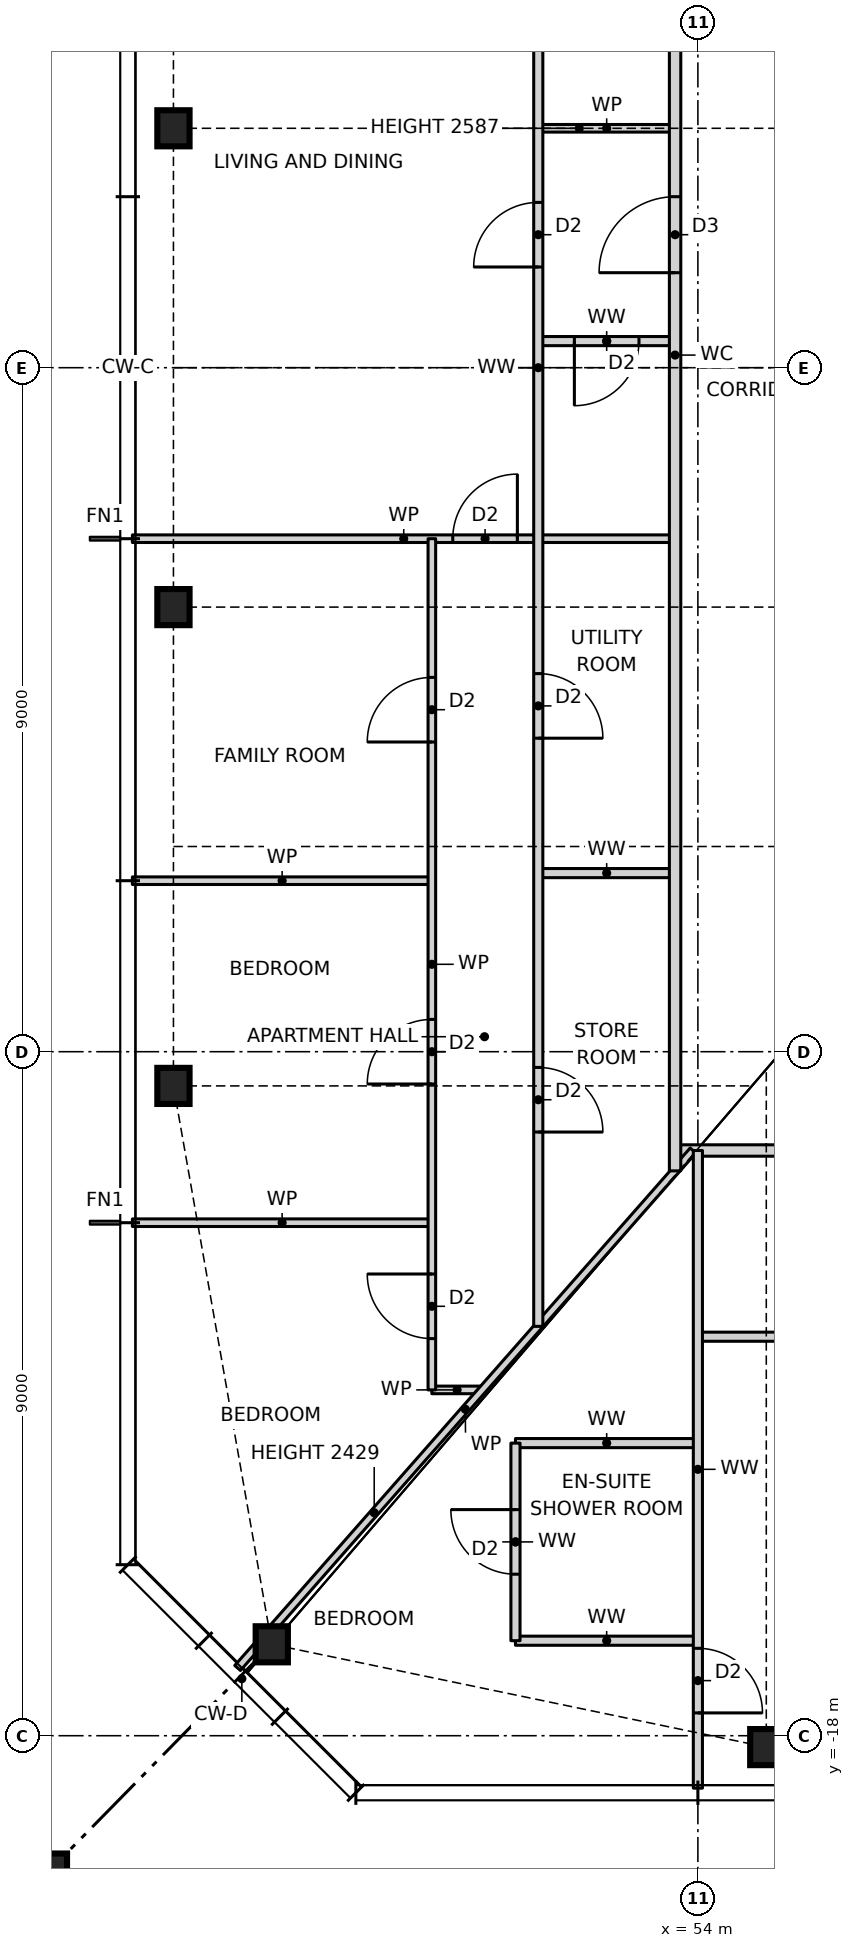
"""IFC4 building model, lengths in metres.
Left out: names, types, materials, properties, quantities, classifications, styles, units other than length and angle.
Written with IfcOpenShell. Run it as: python <this file> out.ifc"""

import sys

from ifc_helpers import new_model, si_unit, direction, frame, frame_2d, origin, origin_2d, place, context, subcontext, project, spatial, rectangle, hollow_rectangle, i_section, extrude, element, fill, save


model = new_model("IFC4")
c1 = context("Model", 3, precision=1e-05, world=origin(), true_north=direction((0.0, 1.0)))
c2 = subcontext(c1, "Body", "Model", "MODEL_VIEW")
j1 = project(units=[si_unit("LENGTHUNIT", "METRE"), si_unit("PLANEANGLEUNIT", "RADIAN")], contexts=[c1])
p1 = place(None, origin())
s1 = spatial("IfcSite", under=j1, at=p1, CompositionType="ELEMENT")
p2 = place(p1, origin())
s2 = spatial("IfcBuilding", under=s1, at=p2, CompositionType="ELEMENT")
p3 = place(p2, frame((0.0, 0.0, 43.0)))
s3 = spatial("IfcBuildingStorey", under=s2, at=p3, CompositionType="ELEMENT", Elevation=43.0)
for number, where, z_axis, x_axis in (
    (1, (48.394, -16.797, 0.0), (0.0, 0.0, 1.0), (1.0, 0.0, 0.0)),
    (2, (54.9, -18.15, 0.0), (0.0, 0.0, 1.0), (1.0, 0.0, 0.0)),
    (3, (47.1, 3.15, 0.0), (0.0, 0.0, 1.0), (1.0, 0.0, 0.0)),
    (4, (47.1, -3.15, 0.0), (0.0, 0.0, 1.0), (1.0, 0.0, 0.0)),
    (5, (47.1, -9.45, 0.0), (0.0, 0.0, 1.0), (1.0, 0.0, 0.0)),
):
    element("IfcColumn", number, at=place(p3, frame(where, z_axis=z_axis, x_axis=x_axis)), inside=s3, PredefinedType="COLUMN", context=c2, shape_type="SweptSolid", body=[
        extrude(i_section(OverallWidth=0.424, OverallDepth=0.475, WebThickness=0.048, FlangeThickness=0.077, at=origin_2d()), origin(), (0.0, 0.0, 1.0), 3.5),
    ])
p4 = place(p3, frame((45.1, -20.15, 0.0), z_axis=(0.0, 0.0, 1.0), x_axis=(1.0, 0.0, 0.0)))
e6 = element("IfcColumn", 6, at=p4, inside=s3, PredefinedType="COLUMN", context=c2, shape_type="SweptSolid", body=[
    extrude(hollow_rectangle(XDim=1.2, YDim=1.2, WallThickness=0.07, at=origin_2d()), origin(), (0.0, 0.0, 1.0), 3.5),
])
for number, where, z_axis, x_axis in (
    (7, (51.6, -16.75, 0.0), (0.0, 0.0, 1.0), (1.0, 0.0, 0.0)),
    (8, (51.6, -14.15, 0.0), (0.0, 0.0, 1.0), (1.0, 0.0, 0.0)),
):
    element("IfcWall", number, at=place(p3, frame(where, z_axis=z_axis, x_axis=x_axis)), inside=s3, PredefinedType="PARTITIONING", context=c2, shape_type="SweptSolid", body=[
        extrude(rectangle(XDim=2.4, YDim=0.12, at=frame_2d((1.2, 0.0))), origin(), (0.0, 0.0, 1.0), 3.27),
    ])
p5 = place(p3, frame((50.5, -13.45, 0.0), z_axis=(0.0, 0.0, 1.0), x_axis=(1.0, 0.0, 0.0)))
e9 = element("IfcWall", 9, at=p5, inside=s3, PredefinedType="PARTITIONING", context=c2, shape_type="SweptSolid", body=[
    extrude(rectangle(XDim=0.664, YDim=0.1, at=frame_2d((0.332, 0.0))), origin(), (0.0, 0.0, 1.0), 3.27),
])
p6 = place(p3, frame((54.0, -12.75, 0.0), z_axis=(0.0, 0.0, 1.0), x_axis=(1.0, 0.0, 0.0)))
e10 = element("IfcWall", 10, at=p6, inside=s3, PredefinedType="PARTITIONING", context=c2, shape_type="SweptSolid", body=[
    extrude(rectangle(XDim=20.2, YDim=0.12, at=frame_2d((10.1, 0.0))), origin(), (0.0, 0.0, 1.0), 3.27),
])
p7 = place(p6, frame((1.375, 0.0, 0.0)))
e11 = element("IfcOpeningElement", 11, at=p7, cuts=e10, PredefinedType="OPENING", context=c2, shape_type="SweptSolid", body=[
    extrude(rectangle(XDim=0.85, YDim=2.1, at=frame_2d((0.425, 1.05))), frame((0.0, 0.07, 0.0), z_axis=(0.0, -1.0, 0.0), x_axis=(1.0, 0.0, 0.0)), (0.0, 0.0, 1.0), 0.14),
])
p8 = place(p6, frame((4.575, 0.0, 0.0)))
e12 = element("IfcOpeningElement", 12, at=p8, cuts=e10, PredefinedType="OPENING", context=c2, shape_type="SweptSolid", body=[
    extrude(rectangle(XDim=0.85, YDim=2.1, at=frame_2d((0.425, 1.05))), frame((0.0, 0.07, 0.0), z_axis=(0.0, -1.0, 0.0), x_axis=(1.0, 0.0, 0.0)), (0.0, 0.0, 1.0), 0.14),
])
p9 = place(p6, frame((10.225, 0.0, 0.0)))
e13 = element("IfcOpeningElement", 13, at=p9, cuts=e10, PredefinedType="OPENING", context=c2, shape_type="SweptSolid", body=[
    extrude(rectangle(XDim=0.85, YDim=2.1, at=frame_2d((0.425, 1.05))), frame((0.0, 0.07, 0.0), z_axis=(0.0, -1.0, 0.0), x_axis=(1.0, 0.0, 0.0)), (0.0, 0.0, 1.0), 0.14),
])
p10 = place(p6, frame((15.825, 0.0, 0.0)))
e14 = element("IfcOpeningElement", 14, at=p10, cuts=e10, PredefinedType="OPENING", context=c2, shape_type="SweptSolid", body=[
    extrude(rectangle(XDim=0.85, YDim=2.1, at=frame_2d((0.425, 1.05))), frame((0.0, 0.07, 0.0), z_axis=(0.0, -1.0, 0.0), x_axis=(1.0, 0.0, 0.0)), (0.0, 0.0, 1.0), 0.14),
])
p11 = place(p3, frame((46.56, -11.25, 0.0), z_axis=(0.0, 0.0, 1.0), x_axis=(1.0, 0.0, 0.0)))
e15 = element("IfcWall", 15, at=p11, inside=s3, PredefinedType="PARTITIONING", context=c2, shape_type="SweptSolid", body=[
    extrude(rectangle(XDim=3.94, YDim=0.1, at=frame_2d((1.97, 0.0))), origin(), (0.0, 0.0, 1.0), 3.27),
])
p12 = place(p3, frame((53.7, -10.3, 0.0), z_axis=(0.0, 0.0, 1.0), x_axis=(1.0, 0.0, 0.0)))
e16 = element("IfcWall", 16, at=p12, inside=s3, PredefinedType="PARTITIONING", context=c2, shape_type="SweptSolid", body=[
    extrude(rectangle(XDim=18.6, YDim=0.15, at=frame_2d((9.3, 0.0))), origin(), (0.0, 0.0, 1.0), 3.27),
])
p13 = place(p12, frame((4.8, 0.0, 0.0)))
e17 = element("IfcOpeningElement", 17, at=p13, cuts=e16, PredefinedType="OPENING", context=c2, shape_type="SweptSolid", body=[
    extrude(rectangle(XDim=1.0, YDim=2.1, at=frame_2d((0.5, 1.05))), frame((0.0, 0.085, 0.0), z_axis=(0.0, -1.0, 0.0), x_axis=(1.0, 0.0, 0.0)), (0.0, 0.0, 1.0), 0.17),
])
p14 = place(p3, frame((46.56, -6.75, 0.0), z_axis=(0.0, 0.0, 1.0), x_axis=(1.0, 0.0, 0.0)))
e18 = element("IfcWall", 18, at=p14, inside=s3, PredefinedType="PARTITIONING", context=c2, shape_type="SweptSolid", body=[
    extrude(rectangle(XDim=3.94, YDim=0.1, at=frame_2d((1.97, 0.0))), origin(), (0.0, 0.0, 1.0), 3.27),
])
p15 = place(p3, frame((51.9, -6.65, 0.0), z_axis=(0.0, 0.0, 1.0), x_axis=(1.0, 0.0, 0.0)))
e19 = element("IfcWall", 19, at=p15, inside=s3, PredefinedType="PARTITIONING", context=c2, shape_type="SweptSolid", body=[
    extrude(rectangle(XDim=1.8, YDim=0.12, at=frame_2d((0.9, 0.0))), origin(), (0.0, 0.0, 1.0), 3.27),
])
p16 = place(p3, frame((46.56, -2.25, 0.0), z_axis=(0.0, 0.0, 1.0), x_axis=(1.0, 0.0, 0.0)))
e20 = element("IfcWall", 20, at=p16, inside=s3, PredefinedType="PARTITIONING", context=c2, shape_type="SweptSolid", body=[
    extrude(rectangle(XDim=7.14, YDim=0.1, at=frame_2d((3.57, 0.0))), origin(), (0.0, 0.0, 1.0), 3.27),
])
p17 = place(p16, frame((4.215, 0.0, 0.0)))
e21 = element("IfcOpeningElement", 21, at=p17, cuts=e20, PredefinedType="OPENING", context=c2, shape_type="SweptSolid", body=[
    extrude(rectangle(XDim=0.85, YDim=2.1, at=frame_2d((0.425, 1.05))), frame((0.0, 0.06, 0.0), z_axis=(0.0, -1.0, 0.0), x_axis=(1.0, 0.0, 0.0)), (0.0, 0.0, 1.0), 0.12),
])
p18 = place(p3, frame((51.9, 0.35, 0.0), z_axis=(0.0, 0.0, 1.0), x_axis=(1.0, 0.0, 0.0)))
e22 = element("IfcWall", 22, at=p18, inside=s3, PredefinedType="PARTITIONING", context=c2, shape_type="SweptSolid", body=[
    extrude(rectangle(XDim=1.8, YDim=0.12, at=frame_2d((0.9, 0.0))), origin(), (0.0, 0.0, 1.0), 3.27),
])
p19 = place(p18, frame((0.475, 0.0, 0.0)))
e23 = element("IfcOpeningElement", 23, at=p19, cuts=e22, PredefinedType="OPENING", context=c2, shape_type="SweptSolid", body=[
    extrude(rectangle(XDim=0.85, YDim=2.1, at=frame_2d((0.425, 1.05))), frame((0.0, 0.07, 0.0), z_axis=(0.0, -1.0, 0.0), x_axis=(1.0, 0.0, 0.0)), (0.0, 0.0, 1.0), 0.14),
])
p20 = place(p3, frame((51.9, 3.15, 0.0), z_axis=(0.0, 0.0, 1.0), x_axis=(1.0, 0.0, 0.0)))
e24 = element("IfcWall", 24, at=p20, inside=s3, PredefinedType="PARTITIONING", context=c2, shape_type="SweptSolid", body=[
    extrude(rectangle(XDim=1.8, YDim=0.1, at=frame_2d((0.9, 0.0))), origin(), (0.0, 0.0, 1.0), 2.587),
])
p21 = place(p3, frame((47.944, -17.109, 0.0), z_axis=(0.0, 0.0, 1.0), x_axis=(0.660638210404, 0.750704439146, 0.0)))
e25 = element("IfcWall", 25, at=p21, inside=s3, PredefinedType="PARTITIONING", context=c2, shape_type="SweptSolid", body=[
    extrude(rectangle(XDim=9.07, YDim=0.1, at=frame_2d((4.535, 0.0))), origin(), (0.0, 0.0, 1.0), 2.429),
])
p22 = place(p3, frame((54.0, -18.69, 0.0), z_axis=(0.0, 0.0, 1.0), x_axis=(0.0, 1.0, 0.0)))
e26 = element("IfcWall", 26, at=p22, inside=s3, PredefinedType="PARTITIONING", context=c2, shape_type="SweptSolid", body=[
    extrude(rectangle(XDim=8.39, YDim=0.12, at=frame_2d((4.195, 0.0))), origin(), (0.0, 0.0, 1.0), 3.27),
])
p23 = place(p22, frame((0.99, 0.0, 0.0)))
e27 = element("IfcOpeningElement", 27, at=p23, cuts=e26, PredefinedType="OPENING", context=c2, shape_type="SweptSolid", body=[
    extrude(rectangle(XDim=0.85, YDim=2.1, at=frame_2d((0.425, 1.05))), frame((0.0, 0.07, 0.0), z_axis=(0.0, -1.0, 0.0), x_axis=(1.0, 0.0, 0.0)), (0.0, 0.0, 1.0), 0.14),
])
p24 = place(p3, frame((53.7, -10.568, 0.0), z_axis=(0.0, 0.0, 1.0), x_axis=(0.0, 1.0, 0.0)))
e28 = element("IfcWall", 28, at=p24, inside=s3, PredefinedType="PARTITIONING", context=c2, shape_type="SweptSolid", body=[
    extrude(rectangle(XDim=21.468, YDim=0.15, at=frame_2d((10.734, 0.0))), origin(), (0.0, 0.0, 1.0), 3.27),
])
p25 = place(p24, frame((11.818, 0.0, 0.0)))
e29 = element("IfcOpeningElement", 29, at=p25, cuts=e28, PredefinedType="OPENING", context=c2, shape_type="SweptSolid", body=[
    extrude(rectangle(XDim=1.0, YDim=2.1, at=frame_2d((0.5, 1.05))), frame((0.0, 0.085, 0.0), z_axis=(0.0, -1.0, 0.0), x_axis=(1.0, 0.0, 0.0)), (0.0, 0.0, 1.0), 0.17),
])
p26 = place(p3, frame((51.9, -12.614, 0.0), z_axis=(0.0, 0.0, 1.0), x_axis=(0.0, 1.0, 0.0)))
e30 = element("IfcWall", 30, at=p26, inside=s3, PredefinedType="PARTITIONING", context=c2, shape_type="SweptSolid", body=[
    extrude(rectangle(XDim=25.228, YDim=0.12, at=frame_2d((12.614, 0.0))), origin(), (0.0, 0.0, 1.0), 3.27),
])
p27 = place(p26, frame((17.139, 0.0, 0.0)))
e31 = element("IfcOpeningElement", 31, at=p27, cuts=e30, PredefinedType="OPENING", context=c2, shape_type="SweptSolid", body=[
    extrude(rectangle(XDim=0.85, YDim=2.1, at=frame_2d((0.425, 1.05))), frame((0.0, 0.07, 0.0), z_axis=(0.0, -1.0, 0.0), x_axis=(1.0, 0.0, 0.0)), (0.0, 0.0, 1.0), 0.14),
])
p28 = place(p26, frame((13.939, 0.0, 0.0)))
e32 = element("IfcOpeningElement", 32, at=p28, cuts=e30, PredefinedType="OPENING", context=c2, shape_type="SweptSolid", body=[
    extrude(rectangle(XDim=0.85, YDim=2.1, at=frame_2d((0.425, 1.05))), frame((0.0, 0.07, 0.0), z_axis=(0.0, -1.0, 0.0), x_axis=(1.0, 0.0, 0.0)), (0.0, 0.0, 1.0), 0.14),
])
p29 = place(p26, frame((21.871, 0.0, 0.0)))
e33 = element("IfcOpeningElement", 33, at=p29, cuts=e30, PredefinedType="OPENING", context=c2, shape_type="SweptSolid", body=[
    extrude(rectangle(XDim=0.85, YDim=2.1, at=frame_2d((0.425, 1.05))), frame((0.0, 0.07, 0.0), z_axis=(0.0, -1.0, 0.0), x_axis=(1.0, 0.0, 0.0)), (0.0, 0.0, 1.0), 0.14),
])
p30 = place(p26, frame((7.739, 0.0, 0.0)))
e34 = element("IfcOpeningElement", 34, at=p30, cuts=e30, PredefinedType="OPENING", context=c2, shape_type="SweptSolid", body=[
    extrude(rectangle(XDim=0.85, YDim=2.1, at=frame_2d((0.425, 1.05))), frame((0.0, 0.07, 0.0), z_axis=(0.0, -1.0, 0.0), x_axis=(1.0, 0.0, 0.0)), (0.0, 0.0, 1.0), 0.14),
])
p31 = place(p26, frame((2.557, 0.0, 0.0)))
e35 = element("IfcOpeningElement", 35, at=p31, cuts=e30, PredefinedType="OPENING", context=c2, shape_type="SweptSolid", body=[
    extrude(rectangle(XDim=0.85, YDim=2.1, at=frame_2d((0.425, 1.05))), frame((0.0, 0.07, 0.0), z_axis=(0.0, -1.0, 0.0), x_axis=(1.0, 0.0, 0.0)), (0.0, 0.0, 1.0), 0.14),
])
p32 = place(p3, frame((51.6, -16.75, 0.0), z_axis=(0.0, 0.0, 1.0), x_axis=(0.0, 1.0, 0.0)))
e36 = element("IfcWall", 36, at=p32, inside=s3, PredefinedType="PARTITIONING", context=c2, shape_type="SweptSolid", body=[
    extrude(rectangle(XDim=2.6, YDim=0.12, at=frame_2d((1.3, 0.0))), origin(), (0.0, 0.0, 1.0), 3.27),
])
p33 = place(p32, frame((0.875, 0.0, 0.0)))
e37 = element("IfcOpeningElement", 37, at=p33, cuts=e36, PredefinedType="OPENING", context=c2, shape_type="SweptSolid", body=[
    extrude(rectangle(XDim=0.85, YDim=2.1, at=frame_2d((0.425, 1.05))), frame((0.0, 0.07, 0.0), z_axis=(0.0, -1.0, 0.0), x_axis=(1.0, 0.0, 0.0)), (0.0, 0.0, 1.0), 0.14),
])
p34 = place(p3, frame((50.5, -13.45, 0.0), z_axis=(0.0, 0.0, 1.0), x_axis=(0.0, 1.0, 0.0)))
e38 = element("IfcWall", 38, at=p34, inside=s3, PredefinedType="PARTITIONING", context=c2, shape_type="SweptSolid", body=[
    extrude(rectangle(XDim=11.2, YDim=0.1, at=frame_2d((5.6, 0.0))), origin(), (0.0, 0.0, 1.0), 3.27),
])
p35 = place(p34, frame((8.525, 0.0, 0.0)))
e39 = element("IfcOpeningElement", 39, at=p35, cuts=e38, PredefinedType="OPENING", context=c2, shape_type="SweptSolid", body=[
    extrude(rectangle(XDim=0.85, YDim=2.1, at=frame_2d((0.425, 1.05))), frame((0.0, 0.06, 0.0), z_axis=(0.0, -1.0, 0.0), x_axis=(1.0, 0.0, 0.0)), (0.0, 0.0, 1.0), 0.12),
])
p36 = place(p34, frame((4.025, 0.0, 0.0)))
e40 = element("IfcOpeningElement", 40, at=p36, cuts=e38, PredefinedType="OPENING", context=c2, shape_type="SweptSolid", body=[
    extrude(rectangle(XDim=0.85, YDim=2.1, at=frame_2d((0.425, 1.05))), frame((0.0, 0.06, 0.0), z_axis=(0.0, -1.0, 0.0), x_axis=(1.0, 0.0, 0.0)), (0.0, 0.0, 1.0), 0.12),
])
p37 = place(p34, frame((0.675, 0.0, 0.0)))
e41 = element("IfcOpeningElement", 41, at=p37, cuts=e38, PredefinedType="OPENING", context=c2, shape_type="SweptSolid", body=[
    extrude(rectangle(XDim=0.85, YDim=2.1, at=frame_2d((0.425, 1.05))), frame((0.0, 0.06, 0.0), z_axis=(0.0, -1.0, 0.0), x_axis=(1.0, 0.0, 0.0)), (0.0, 0.0, 1.0), 0.12),
])
p38 = place(p33, origin())
e42 = element("IfcDoor", 42, at=p38, inside=s3, OperationType="SINGLE_SWING_RIGHT", PredefinedType="DOOR", context=c2, shape_type="SweptSolid", body=[
    extrude(rectangle(XDim=0.85, YDim=2.1, at=frame_2d((0.425, 1.05))), frame((0.0, 0.025, 0.0), z_axis=(0.0, -1.0, 0.0), x_axis=(1.0, 0.0, 0.0)), (0.0, 0.0, 1.0), 0.05),
])
fill(e37, e42)
p39 = place(p23, frame((0.85, 0.0, 0.0), z_axis=(0.0, 0.0, 1.0), x_axis=(-1.0, 0.0, 0.0)))
e43 = element("IfcDoor", 43, at=p39, inside=s3, OperationType="SINGLE_SWING_RIGHT", PredefinedType="DOOR", context=c2, shape_type="SweptSolid", body=[
    extrude(rectangle(XDim=0.85, YDim=2.1, at=frame_2d((0.425, 1.05))), frame((0.0, 0.025, 0.0), z_axis=(0.0, -1.0, 0.0), x_axis=(1.0, 0.0, 0.0)), (0.0, 0.0, 1.0), 0.05),
])
fill(e27, e43)
p40 = place(p25, origin())
e44 = element("IfcDoor", 44, at=p40, inside=s3, OperationType="SINGLE_SWING_LEFT", PredefinedType="DOOR", context=c2, shape_type="SweptSolid", body=[
    extrude(rectangle(XDim=1.0, YDim=2.1, at=frame_2d((0.5, 1.05))), frame((0.0, 0.025, 0.0), z_axis=(0.0, -1.0, 0.0), x_axis=(1.0, 0.0, 0.0)), (0.0, 0.0, 1.0), 0.05),
])
fill(e29, e44)
p41 = place(p28, origin())
e45 = element("IfcDoor", 45, at=p41, inside=s3, OperationType="SINGLE_SWING_LEFT", PredefinedType="DOOR", context=c2, shape_type="SweptSolid", body=[
    extrude(rectangle(XDim=0.85, YDim=2.1, at=frame_2d((0.425, 1.05))), frame((0.0, 0.025, 0.0), z_axis=(0.0, -1.0, 0.0), x_axis=(1.0, 0.0, 0.0)), (0.0, 0.0, 1.0), 0.05),
])
fill(e32, e45)
p42 = place(p19, frame((0.85, 0.0, 0.0), z_axis=(0.0, 0.0, 1.0), x_axis=(-1.0, 0.0, 0.0)))
e46 = element("IfcDoor", 46, at=p42, inside=s3, OperationType="SINGLE_SWING_RIGHT", PredefinedType="DOOR", context=c2, shape_type="SweptSolid", body=[
    extrude(rectangle(XDim=0.85, YDim=2.1, at=frame_2d((0.425, 1.05))), frame((0.0, 0.025, 0.0), z_axis=(0.0, -1.0, 0.0), x_axis=(1.0, 0.0, 0.0)), (0.0, 0.0, 1.0), 0.05),
])
fill(e23, e46)
p43 = place(p17, origin())
e47 = element("IfcDoor", 47, at=p43, inside=s3, OperationType="SINGLE_SWING_RIGHT", PredefinedType="DOOR", context=c2, shape_type="SweptSolid", body=[
    extrude(rectangle(XDim=0.85, YDim=2.1, at=frame_2d((0.425, 1.05))), frame((0.0, 0.025, 0.0), z_axis=(0.0, -1.0, 0.0), x_axis=(1.0, 0.0, 0.0)), (0.0, 0.0, 1.0), 0.05),
])
fill(e21, e47)
p44 = place(p35, origin())
e48 = element("IfcDoor", 48, at=p44, inside=s3, OperationType="SINGLE_SWING_LEFT", PredefinedType="DOOR", context=c2, shape_type="SweptSolid", body=[
    extrude(rectangle(XDim=0.85, YDim=2.1, at=frame_2d((0.425, 1.05))), frame((0.0, 0.025, 0.0), z_axis=(0.0, -1.0, 0.0), x_axis=(1.0, 0.0, 0.0)), (0.0, 0.0, 1.0), 0.05),
])
fill(e39, e48)
p45 = place(p36, origin())
e49 = element("IfcDoor", 49, at=p45, inside=s3, OperationType="SINGLE_SWING_LEFT", PredefinedType="DOOR", context=c2, shape_type="SweptSolid", body=[
    extrude(rectangle(XDim=0.85, YDim=2.1, at=frame_2d((0.425, 1.05))), frame((0.0, 0.025, 0.0), z_axis=(0.0, -1.0, 0.0), x_axis=(1.0, 0.0, 0.0)), (0.0, 0.0, 1.0), 0.05),
])
fill(e40, e49)
p46 = place(p37, origin())
e50 = element("IfcDoor", 50, at=p46, inside=s3, OperationType="SINGLE_SWING_RIGHT", PredefinedType="DOOR", context=c2, shape_type="SweptSolid", body=[
    extrude(rectangle(XDim=0.85, YDim=2.1, at=frame_2d((0.425, 1.05))), frame((0.0, 0.025, 0.0), z_axis=(0.0, -1.0, 0.0), x_axis=(1.0, 0.0, 0.0)), (0.0, 0.0, 1.0), 0.05),
])
fill(e41, e50)
p47 = place(p30, frame((0.85, 0.0, 0.0), z_axis=(0.0, 0.0, 1.0), x_axis=(-1.0, 0.0, 0.0)))
e51 = element("IfcDoor", 51, at=p47, inside=s3, OperationType="SINGLE_SWING_RIGHT", PredefinedType="DOOR", context=c2, shape_type="SweptSolid", body=[
    extrude(rectangle(XDim=0.85, YDim=2.1, at=frame_2d((0.425, 1.05))), frame((0.0, 0.025, 0.0), z_axis=(0.0, -1.0, 0.0), x_axis=(1.0, 0.0, 0.0)), (0.0, 0.0, 1.0), 0.05),
])
fill(e34, e51)
p48 = place(p31, frame((0.85, 0.0, 0.0), z_axis=(0.0, 0.0, 1.0), x_axis=(-1.0, 0.0, 0.0)))
e52 = element("IfcDoor", 52, at=p48, inside=s3, OperationType="SINGLE_SWING_RIGHT", PredefinedType="DOOR", context=c2, shape_type="SweptSolid", body=[
    extrude(rectangle(XDim=0.85, YDim=2.1, at=frame_2d((0.425, 1.05))), frame((0.0, 0.025, 0.0), z_axis=(0.0, -1.0, 0.0), x_axis=(1.0, 0.0, 0.0)), (0.0, 0.0, 1.0), 0.05),
])
fill(e35, e52)
save(model, sys.argv[1])
